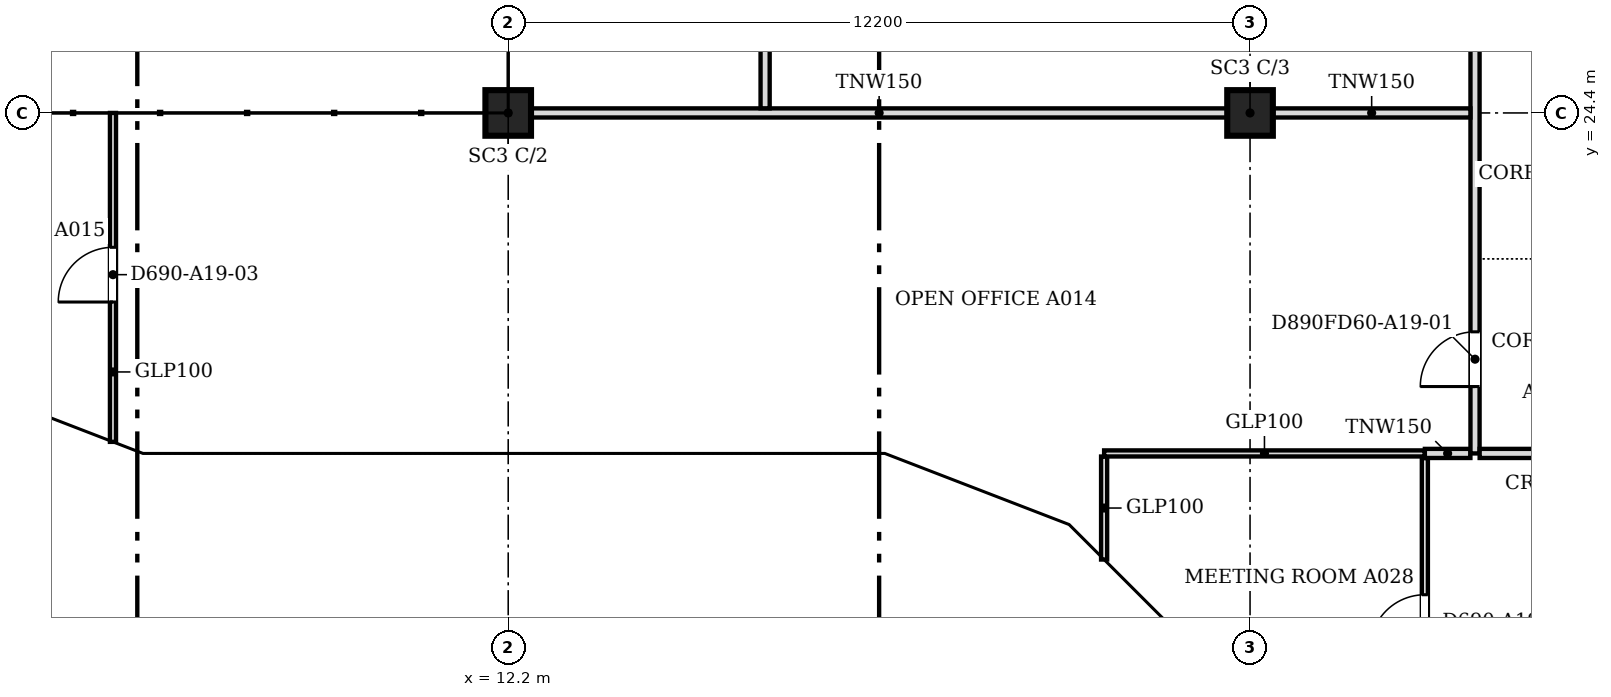
"""IFC4 building model, lengths in metres.
Left out: names, types, materials, properties, quantities, classifications, styles, units other than length and angle.
Written with IfcOpenShell. Run it as: python <this file> out.ifc"""

import sys

from ifc_helpers import new_model, si_unit, direction, frame, frame_2d, origin, origin_2d, place, context, subcontext, project, spatial, polyline, rectangle, outline, extrude, faceted_brep, source, transform, mapped, element, fill, save


model = new_model("IFC4")
c1 = context("Model", 3, precision=1e-05, world=origin(), true_north=direction((0.0, 1.0)))
c2 = subcontext(c1, "Body", "Model", "MODEL_VIEW")
j1 = project(units=[si_unit("LENGTHUNIT", "METRE"), si_unit("PLANEANGLEUNIT", "RADIAN")], contexts=[c1])
p1 = place(None, origin())
s1 = spatial("IfcSite", under=j1, at=p1, CompositionType="ELEMENT")
p2 = place(p1, origin())
s2 = spatial("IfcBuilding", under=s1, at=p2, CompositionType="ELEMENT")
p3 = place(p2, frame((0.0, 0.0, 209.3)))
s3 = spatial("IfcBuildingStorey", under=s2, at=p3, CompositionType="ELEMENT", Elevation=209.3)
for number, where, z_axis, x_axis in (
    (1, (12.2, 24.4, 0.0), (0.0, 0.0, 1.0), (1.0, 0.0, 0.0)),
    (2, (24.4, 24.4, 0.0), (0.0, 0.0, 1.0), (1.0, 0.0, 0.0)),
):
    element("IfcColumn", number, at=place(p3, frame(where, z_axis=z_axis, x_axis=x_axis)), inside=s3, PredefinedType="COLUMN", context=c2, shape_type="SweptSolid", body=[
        extrude(rectangle(XDim=0.75, YDim=0.75, at=origin_2d()), origin(), (0.0, 0.0, 1.0), 3.6),
    ])
m1 = source(origin(), c2, "Body", "Brep", [
    faceted_brep([(0.053, -0.25, 0.0), (3.003, -0.25, 3.8), (0.053, -0.25, 7.6), (0.0, -0.25, 7.532), (0.0, -0.25, 0.068), (0.106, 0.25, 7.532), (2.957, 0.25, 3.86), (2.957, 0.25, 3.74), (0.106, 0.25, 0.068), (3.003, 0.0, 3.8), (0.053, 0.0, 0.0), (0.053, 0.0, 7.6)], [[[0, 1, 2, 3, 4]], [[5, 6, 7, 8]], [[8, 7, 9, 1, 0, 10]], [[6, 5, 11, 2, 1, 9]], [[3, 2, 11]], [[10, 0, 4]], [[8, 10, 4, 3, 11, 5]], [[9, 7, 6]]]),
])
p4 = place(p3, frame((3.344, 19.631, -3.8), z_axis=(0.0, 0.0, 1.0), x_axis=(0.933007896601, -0.359855894603, 0.0)))
e3 = element("IfcWall", 3, at=p4, inside=s3, PredefinedType="SOLIDWALL", context=c2, shape_type="MappedRepresentation", body=[
    mapped(m1, transform((0.0, 0.0, 0.0), scale=1.0)),
])
m2 = source(origin(), c2, "Body", "SweptSolid", [
    extrude(outline(polyline([(0.253, 0.665), (2.687, 3.8), (0.253, 6.935), (0.253, 0.665)])), frame((0.0, 0.26, 0.0), z_axis=(0.0, -1.0, 0.0), x_axis=(1.0, 0.0, 0.0)), (0.0, 0.0, 1.0), 0.52),
])
p5 = place(p4, origin())
e4 = element("IfcOpeningElement", 4, at=p5, cuts=e3, PredefinedType="OPENING", context=c2, shape_type="MappedRepresentation", body=[
    mapped(m2, transform((0.0, 0.0, 0.0), scale=1.0)),
])
m3 = source(origin(), c2, "Body", "Brep", [
    faceted_brep([(3.003, -0.25, 0.0), (6.053, -0.25, 3.8), (3.003, -0.25, 7.6), (0.0, -0.25, 3.8), (0.047, 0.25, 3.859), (3.003, 0.25, 7.6), (6.053, 0.25, 3.8), (3.003, 0.25, 0.0), (0.047, 0.25, 3.741), (0.0, 0.0, 3.8)], [[[0, 1, 2, 3]], [[4, 5, 6, 7, 8]], [[7, 6, 1, 0]], [[6, 5, 2, 1]], [[5, 4, 9, 3, 2]], [[8, 7, 0, 3, 9]], [[8, 9, 4]]]),
])
p6 = place(p3, frame((6.146, 18.55, -3.8), z_axis=(0.0, 0.0, 1.0), x_axis=(1.0, 0.0, 0.0)))
e5 = element("IfcWall", 5, at=p6, inside=s3, PredefinedType="SOLIDWALL", context=c2, shape_type="MappedRepresentation", body=[
    mapped(m3, transform((0.0, 0.0, 0.0), scale=1.0)),
])
m4 = source(origin(), c2, "Body", "SweptSolid", [
    extrude(outline(polyline([(3.005, 0.401), (5.733, 3.8), (3.005, 7.199), (0.319, 3.8), (3.005, 0.401)])), frame((0.0, 0.26, 0.0), z_axis=(0.0, -1.0, 0.0), x_axis=(1.0, 0.0, 0.0)), (0.0, 0.0, 1.0), 0.52),
])
p7 = place(p6, origin())
e6 = element("IfcOpeningElement", 6, at=p7, cuts=e5, PredefinedType="OPENING", context=c2, shape_type="MappedRepresentation", body=[
    mapped(m4, transform((0.0, 0.0, 0.0), scale=1.0)),
])
m5 = source(origin(), c2, "Body", "Brep", [
    faceted_brep([(3.05, -0.25, 0.0), (6.1, -0.25, 3.743), (6.1, -0.25, 3.857), (3.05, -0.25, 7.6), (0.0, -0.25, 3.8), (0.0, 0.25, 3.8), (3.05, 0.25, 7.6), (6.146, 0.25, 3.8), (3.05, 0.25, 0.0), (6.146, -0.0, 3.8)], [[[0, 1, 2, 3, 4]], [[5, 6, 7, 8]], [[8, 7, 9, 1, 0]], [[7, 6, 3, 2, 9]], [[6, 5, 4, 3]], [[5, 8, 0, 4]], [[1, 9, 2]]]),
])
p8 = place(p3, frame((12.2, 18.55, -3.8), z_axis=(0.0, 0.0, 1.0), x_axis=(1.0, 0.0, 0.0)))
e7 = element("IfcWall", 7, at=p8, inside=s3, PredefinedType="SOLIDWALL", context=c2, shape_type="MappedRepresentation", body=[
    mapped(m5, transform((0.0, 0.0, 0.0), scale=1.0)),
])
m6 = source(origin(), c2, "Body", "SweptSolid", [
    extrude(outline(polyline([(3.052, 0.397), (5.824, 3.8), (3.052, 7.202), (0.321, 3.8), (3.052, 0.397)])), frame((0.0, 0.26, 0.0), z_axis=(0.0, -1.0, 0.0), x_axis=(1.0, 0.0, 0.0)), (0.0, 0.0, 1.0), 0.52),
])
p9 = place(p8, origin())
e8 = element("IfcOpeningElement", 8, at=p9, cuts=e7, PredefinedType="OPENING", context=c2, shape_type="MappedRepresentation", body=[
    mapped(m6, transform((0.0, 0.0, 0.0), scale=1.0)),
])
m7 = source(origin(), c2, "Body", "Brep", [
    faceted_brep([(3.096, -0.25, 7.536), (0.047, -0.25, 3.856), (0.047, -0.25, 3.744), (3.096, -0.25, 0.064), (0.0, 0.25, 3.8), (3.149, 0.25, 7.6), (3.202, 0.25, 7.536), (3.202, 0.25, 0.064), (3.149, 0.25, 0.0), (3.149, -0.0, 0.0), (3.149, -0.0, 7.6), (0.0, 0.0, 3.8)], [[[0, 1, 2, 3]], [[4, 5, 6, 7, 8]], [[8, 7, 9]], [[6, 5, 10]], [[5, 4, 11, 1, 0, 10]], [[4, 8, 9, 3, 2, 11]], [[11, 2, 1]], [[3, 9, 7, 6, 10, 0]]]),
])
p10 = place(p3, frame((18.346, 18.55, -3.8), z_axis=(0.0, 0.0, 1.0), x_axis=(0.932985567668, -0.359913782069, 0.0)))
e9 = element("IfcWall", 9, at=p10, inside=s3, PredefinedType="SOLIDWALL", context=c2, shape_type="MappedRepresentation", body=[
    mapped(m7, transform((0.0, 0.0, 0.0), scale=1.0)),
])
m8 = source(origin(), c2, "Body", "SweptSolid", [
    extrude(outline(polyline([(2.949, 6.967), (0.325, 3.8), (2.949, 0.633), (2.949, 6.967)])), frame((0.0, 0.26, 0.0), z_axis=(0.0, -1.0, 0.0), x_axis=(1.0, 0.0, 0.0)), (0.0, 0.0, 1.0), 0.52),
])
p11 = place(p10, origin())
e10 = element("IfcOpeningElement", 10, at=p11, cuts=e9, PredefinedType="OPENING", context=c2, shape_type="MappedRepresentation", body=[
    mapped(m8, transform((0.0, 0.0, 0.0), scale=1.0)),
])
m9 = source(origin(), c2, "Body", "Brep", [
    faceted_brep([(0.106, -0.25, 0.064), (3.156, -0.25, 3.736), (3.156, -0.25, 3.864), (0.106, -0.25, 7.536), (0.0, 0.25, 7.536), (0.053, 0.25, 7.6), (3.209, 0.25, 3.8), (0.053, 0.25, 0.0), (0.0, 0.25, 0.064), (3.209, -0.0, 3.8), (0.053, 0.0, 0.0), (0.053, 0.0, 7.6)], [[[0, 1, 2, 3]], [[4, 5, 6, 7, 8]], [[7, 6, 9, 1, 0, 10]], [[6, 5, 11, 3, 2, 9]], [[5, 4, 11]], [[8, 7, 10]], [[8, 10, 0, 3, 11, 4]], [[1, 9, 2]]]),
])
p12 = place(p3, frame((21.248, 17.454, -3.8), z_axis=(0.0, 0.0, 1.0), x_axis=(0.707106781187, -0.707106781187, 0.0)))
e11 = element("IfcWall", 11, at=p12, inside=s3, PredefinedType="SOLIDWALL", context=c2, shape_type="MappedRepresentation", body=[
    mapped(m9, transform((0.0, 0.0, 0.0), scale=1.0)),
])
m10 = source(origin(), c2, "Body", "SweptSolid", [
    extrude(outline(polyline([(0.253, 0.632), (2.884, 3.8), (0.253, 6.968), (0.253, 0.632)])), frame((0.0, 0.26, 0.0), z_axis=(0.0, -1.0, 0.0), x_axis=(1.0, 0.0, 0.0)), (0.0, 0.0, 1.0), 0.52),
])
p13 = place(p12, origin())
e12 = element("IfcOpeningElement", 12, at=p13, cuts=e11, PredefinedType="OPENING", context=c2, shape_type="MappedRepresentation", body=[
    mapped(m10, transform((0.0, 0.0, 0.0), scale=1.0)),
])
p14 = place(p2, frame((0.0, 0.0, 213.1)))
s4 = spatial("IfcBuildingStorey", under=s2, at=p14, CompositionType="ELEMENT", Elevation=213.1)
m11 = source(origin(), c2, "Body", "Brep", [
    faceted_brep([(2.95, -0.25, 0.0), (2.997, -0.25, 0.059), (2.997, -0.25, 7.541), (2.95, -0.25, 7.6), (0.0, -0.25, 3.8), (0.053, 0.25, 3.868), (2.904, 0.25, 7.54), (2.904, 0.25, 0.06), (0.053, 0.25, 3.732), (2.95, 0.0, 0.0), (2.95, 0.0, 7.6), (0.0, 0.0, 3.8)], [[[0, 1, 2, 3, 4]], [[5, 6, 7, 8]], [[1, 0, 9]], [[10, 3, 2]], [[6, 5, 11, 4, 3, 10]], [[8, 7, 9, 0, 4, 11]], [[8, 11, 5]], [[1, 9, 7, 6, 10, 2]]]),
])
p15 = place(p14, frame((3.394, 19.612, -3.8), z_axis=(0.0, 0.0, 1.0), x_axis=(0.932990326376, -0.359901446078, 0.0)))
e13 = element("IfcWall", 13, at=p15, inside=s4, PredefinedType="SOLIDWALL", context=c2, shape_type="MappedRepresentation", body=[
    mapped(m11, transform((0.0, 0.0, 0.0), scale=1.0)),
])
m12 = source(origin(), c2, "Body", "SweptSolid", [
    extrude(outline(polyline([(2.75, 6.935), (0.316, 3.8), (2.75, 0.665), (2.75, 6.935)])), frame((0.0, 0.26, 0.0), z_axis=(0.0, -1.0, 0.0), x_axis=(1.0, 0.0, 0.0)), (0.0, 0.0, 1.0), 0.52),
])
p16 = place(p15, origin())
e14 = element("IfcOpeningElement", 14, at=p16, cuts=e13, PredefinedType="OPENING", context=c2, shape_type="MappedRepresentation", body=[
    mapped(m12, transform((0.0, 0.0, 0.0), scale=1.0)),
])
m13 = source(origin(), c2, "Body", "Brep", [
    faceted_brep([(0.047, -0.25, 0.0), (3.05, -0.25, 3.8), (0.047, -0.25, 7.6), (0.0, -0.25, 7.54), (0.0, -0.25, 0.06), (0.093, 0.25, 7.541), (3.05, 0.25, 3.8), (0.093, 0.25, 0.059), (0.047, 0.0, 0.0), (0.047, 0.0, 7.6)], [[[0, 1, 2, 3, 4]], [[5, 6, 7]], [[7, 6, 1, 0, 8]], [[6, 5, 9, 2, 1]], [[3, 2, 9]], [[8, 0, 4]], [[7, 8, 4, 3, 9, 5]]]),
])
p17 = place(p14, frame((6.1, 18.55, -3.8), z_axis=(0.0, 0.0, 1.0), x_axis=(1.0, 0.0, 0.0)))
e15 = element("IfcWall", 15, at=p17, inside=s4, PredefinedType="SOLIDWALL", context=c2, shape_type="MappedRepresentation", body=[
    mapped(m13, transform((0.0, 0.0, 0.0), scale=1.0)),
])
m14 = source(origin(), c2, "Body", "SweptSolid", [
    extrude(outline(polyline([(0.247, 0.656), (2.731, 3.8), (0.247, 6.944), (0.247, 0.656)])), frame((0.0, 0.26, 0.0), z_axis=(0.0, -1.0, 0.0), x_axis=(1.0, 0.0, 0.0)), (0.0, 0.0, 1.0), 0.52),
])
p18 = place(p17, origin())
e16 = element("IfcOpeningElement", 16, at=p18, cuts=e15, PredefinedType="OPENING", context=c2, shape_type="MappedRepresentation", body=[
    mapped(m14, transform((0.0, 0.0, 0.0), scale=1.0)),
])
m15 = source(origin(), c2, "Body", "SweptSolid", [
    extrude(outline(polyline([(3.05, 0.0), (6.1, 3.8), (3.05, 7.6), (0.0, 3.8), (3.05, 0.0)])), frame((0.0, 0.25, 0.0), z_axis=(0.0, -1.0, 0.0), x_axis=(1.0, 0.0, 0.0)), (0.0, 0.0, 1.0), 0.5),
])
p19 = place(p14, frame((9.15, 18.55, -3.8), z_axis=(0.0, 0.0, 1.0), x_axis=(1.0, 0.0, 0.0)))
e17 = element("IfcWall", 17, at=p19, inside=s4, PredefinedType="SOLIDWALL", context=c2, shape_type="MappedRepresentation", body=[
    mapped(m15, transform((0.0, 0.0, 0.0), scale=1.0)),
])
m16 = source(origin(), c2, "Body", "SweptSolid", [
    extrude(outline(polyline([(3.05, 0.399), (5.78, 3.8), (3.05, 7.2), (0.321, 3.8), (3.05, 0.399)])), frame((0.0, 0.26, 0.0), z_axis=(0.0, -1.0, 0.0), x_axis=(1.0, 0.0, 0.0)), (0.0, 0.0, 1.0), 0.52),
])
p20 = place(p19, origin())
e18 = element("IfcOpeningElement", 18, at=p20, cuts=e17, PredefinedType="OPENING", context=c2, shape_type="MappedRepresentation", body=[
    mapped(m16, transform((0.0, 0.0, 0.0), scale=1.0)),
])
m17 = source(origin(), c2, "Body", "Brep", [
    faceted_brep([(3.05, -0.25, 7.543), (0.0, -0.25, 3.8), (3.05, -0.25, 0.057), (0.0, 0.25, 3.8), (3.096, 0.25, 7.6), (3.143, 0.25, 7.543), (3.143, 0.25, 0.056), (3.096, 0.25, 0.0), (3.096, -0.0, 0.0), (3.096, -0.0, 7.6)], [[[0, 1, 2]], [[3, 4, 5, 6, 7]], [[7, 6, 8]], [[5, 4, 9]], [[4, 3, 1, 0, 9]], [[3, 7, 8, 2, 1]], [[2, 8, 6, 5, 9, 0]]]),
])
p21 = place(p14, frame((15.25, 18.55, -3.8), z_axis=(0.0, 0.0, 1.0), x_axis=(1.0, 0.0, 0.0)))
e19 = element("IfcWall", 19, at=p21, inside=s4, PredefinedType="SOLIDWALL", context=c2, shape_type="MappedRepresentation", body=[
    mapped(m17, transform((0.0, 0.0, 0.0), scale=1.0)),
])
m18 = source(origin(), c2, "Body", "SweptSolid", [
    extrude(outline(polyline([(2.896, 6.959), (0.323, 3.8), (2.896, 0.641), (2.896, 6.959)])), frame((0.0, 0.26, 0.0), z_axis=(0.0, -1.0, 0.0), x_axis=(1.0, 0.0, 0.0)), (0.0, 0.0, 1.0), 0.52),
])
p22 = place(p21, origin())
e20 = element("IfcOpeningElement", 20, at=p22, cuts=e19, PredefinedType="OPENING", context=c2, shape_type="MappedRepresentation", body=[
    mapped(m18, transform((0.0, 0.0, 0.0), scale=1.0)),
])
m19 = source(origin(), c2, "Body", "Brep", [
    faceted_brep([(0.093, -0.25, 0.056), (3.143, -0.25, 3.736), (3.143, -0.25, 3.864), (0.093, -0.25, 7.544), (0.0, 0.25, 7.543), (0.047, 0.25, 7.6), (3.196, 0.25, 3.8), (0.047, 0.25, 0.0), (0.0, 0.25, 0.057), (3.196, -0.0, 3.8), (0.047, 0.0, 0.0), (0.047, 0.0, 7.6)], [[[0, 1, 2, 3]], [[4, 5, 6, 7, 8]], [[7, 6, 9, 1, 0, 10]], [[6, 5, 11, 3, 2, 9]], [[5, 4, 11]], [[8, 7, 10]], [[8, 10, 0, 3, 11, 4]], [[1, 9, 2]]]),
])
p23 = place(p14, frame((18.303, 18.567, -3.8), z_axis=(0.0, 0.0, 1.0), x_axis=(0.932978940178, -0.359930961693, 0.0)))
e21 = element("IfcWall", 21, at=p23, inside=s4, PredefinedType="SOLIDWALL", context=c2, shape_type="MappedRepresentation", body=[
    mapped(m19, transform((0.0, 0.0, 0.0), scale=1.0)),
])
m20 = source(origin(), c2, "Body", "SweptSolid", [
    extrude(outline(polyline([(0.247, 0.633), (2.871, 3.8), (0.247, 6.967), (0.247, 0.633)])), frame((0.0, 0.26, 0.0), z_axis=(0.0, -1.0, 0.0), x_axis=(1.0, 0.0, 0.0)), (0.0, 0.0, 1.0), 0.52),
])
p24 = place(p23, origin())
e22 = element("IfcOpeningElement", 22, at=p24, cuts=e21, PredefinedType="OPENING", context=c2, shape_type="MappedRepresentation", body=[
    mapped(m20, transform((0.0, 0.0, 0.0), scale=1.0)),
])
m21 = source(origin(), c2, "Body", "Brep", [
    faceted_brep([(3.103, -0.25, 7.536), (0.053, -0.25, 3.864), (0.053, -0.25, 3.736), (3.103, -0.25, 0.064), (0.0, 0.25, 3.8), (3.156, 0.25, 7.6), (3.209, 0.25, 7.536), (3.209, 0.25, 0.064), (3.156, 0.25, 0.0), (3.156, -0.0, 0.0), (3.156, -0.0, 7.6), (0.0, 0.0, 3.8)], [[[0, 1, 2, 3]], [[4, 5, 6, 7, 8]], [[8, 7, 9]], [[6, 5, 10]], [[5, 4, 11, 1, 0, 10]], [[4, 8, 9, 3, 2, 11]], [[2, 1, 11]], [[3, 9, 7, 6, 10, 0]]]),
])
p25 = place(p14, frame((21.285, 17.417, -3.8), z_axis=(0.0, 0.0, 1.0), x_axis=(0.707106781187, -0.707106781187, 0.0)))
e23 = element("IfcWall", 23, at=p25, inside=s4, PredefinedType="SOLIDWALL", context=c2, shape_type="MappedRepresentation", body=[
    mapped(m21, transform((0.0, 0.0, 0.0), scale=1.0)),
])
m22 = source(origin(), c2, "Body", "SweptSolid", [
    extrude(outline(polyline([(2.956, 6.968), (0.325, 3.8), (2.956, 0.632), (2.956, 6.968)])), frame((0.0, 0.26, 0.0), z_axis=(0.0, -1.0, 0.0), x_axis=(1.0, 0.0, 0.0)), (0.0, 0.0, 1.0), 0.52),
])
p26 = place(p25, origin())
e24 = element("IfcOpeningElement", 24, at=p26, cuts=e23, PredefinedType="OPENING", context=c2, shape_type="MappedRepresentation", body=[
    mapped(m22, transform((0.0, 0.0, 0.0), scale=1.0)),
])
p27 = place(p3, frame((27.275, 13.276, 0.0), z_axis=(0.0, 0.0, 1.0), x_axis=(0.0, 1.0, 0.0)))
e25 = element("IfcWall", 25, at=p27, inside=s3, PredefinedType="PARTITIONING", context=c2, shape_type="SweptSolid", body=[
    extrude(rectangle(XDim=5.448, YDim=0.1, at=frame_2d((2.724, 0.0))), origin(), (0.0, 0.0, 1.0), 3.067),
])
m23 = source(origin(), c2, "Body", "SweptSolid", [
    extrude(rectangle(XDim=0.9, YDim=2.1, at=frame_2d((0.45, 1.05))), frame((0.0, 0.06, 0.0), z_axis=(0.0, -1.0, 0.0), x_axis=(1.0, 0.0, 0.0)), (0.0, 0.0, 1.0), 0.12),
])
p28 = place(p27, frame((2.3, 0.0, 0.0)))
e26 = element("IfcOpeningElement", 26, at=p28, cuts=e25, PredefinedType="OPENING", context=c2, shape_type="MappedRepresentation", body=[
    mapped(m23, transform((0.0, 0.0, 0.0), scale=1.0)),
])
p29 = place(p3, frame((22.0, 17.055, 0.0), z_axis=(0.0, 0.0, 1.0), x_axis=(0.0, 1.0, 0.0)))
e27 = element("IfcWall", 27, at=p29, inside=s3, PredefinedType="PARTITIONING", context=c2, shape_type="SweptSolid", body=[
    extrude(rectangle(XDim=1.694, YDim=0.1, at=frame_2d((0.847, 0.0))), origin(), (0.0, 0.0, 1.0), 3.067),
])
p30 = place(p3, frame((22.0, 18.8, 0.0), z_axis=(0.0, 0.0, 1.0), x_axis=(1.0, 0.0, 0.0)))
e28 = element("IfcWall", 28, at=p30, inside=s3, PredefinedType="PARTITIONING", context=c2, shape_type="SweptSolid", body=[
    extrude(rectangle(XDim=5.274, YDim=0.1, at=frame_2d((2.637, 0.0))), origin(), (0.0, 0.0, 1.0), 3.067),
])
p31 = place(p3, frame((27.275, 18.8, 0.0), z_axis=(0.0, 0.0, 1.0), x_axis=(1.0, 0.0, 0.0)))
e29 = element("IfcWall", 29, at=p31, inside=s3, PredefinedType="PARTITIONING", context=c2, shape_type="SweptSolid", body=[
    extrude(rectangle(XDim=0.749, YDim=0.15, at=frame_2d((0.375, 0.0))), origin(), (0.0, 0.0, 1.0), 3.067),
])
p32 = place(p3, frame((28.1, 18.8, 0.0), z_axis=(0.0, 0.0, 1.0), x_axis=(0.0, 1.0, 0.0)))
e30 = element("IfcWall", 30, at=p32, inside=s3, PredefinedType="PARTITIONING", context=c2, shape_type="SweptSolid", body=[
    extrude(rectangle(XDim=26.024, YDim=0.15, at=frame_2d((13.012, 0.0))), origin(), (0.0, 0.0, 1.0), 3.067),
])
m24 = source(origin(), c2, "Body", "SweptSolid", [
    extrude(rectangle(XDim=0.9, YDim=2.1, at=frame_2d((0.45, 1.05))), frame((0.0, 0.085, 0.0), z_axis=(0.0, -1.0, 0.0), x_axis=(1.0, 0.0, 0.0)), (0.0, 0.0, 1.0), 0.17),
])
p33 = place(p32, frame((1.1, 0.0, 0.0)))
e31 = element("IfcOpeningElement", 31, at=p33, cuts=e30, PredefinedType="OPENING", context=c2, shape_type="MappedRepresentation", body=[
    mapped(m24, transform((0.0, 0.0, 0.0), scale=1.0)),
])
m25 = source(origin(), c2, "Body", "SweptSolid", [
    extrude(rectangle(XDim=1.0, YDim=2.1, at=frame_2d((0.5, 1.05))), frame((0.0, 0.085, 0.0), z_axis=(0.0, -1.0, 0.0), x_axis=(1.0, 0.0, 0.0)), (0.0, 0.0, 1.0), 0.17),
])
p34 = place(p32, frame((14.201, 0.0, 0.0)))
e32 = element("IfcOpeningElement", 32, at=p34, cuts=e30, PredefinedType="OPENING", context=c2, shape_type="MappedRepresentation", body=[
    mapped(m25, transform((0.0, 0.0, 0.0), scale=1.0)),
])
p35 = place(p32, frame((8.1, 0.0, 0.0)))
e33 = element("IfcOpeningElement", 33, at=p35, cuts=e30, PredefinedType="OPENING", context=c2, shape_type="MappedRepresentation", body=[
    mapped(m25, transform((0.0, 0.0, 0.0), scale=1.0)),
])
p36 = place(p32, frame((21.5, 0.0, 0.0)))
e34 = element("IfcOpeningElement", 34, at=p36, cuts=e30, PredefinedType="OPENING", context=c2, shape_type="MappedRepresentation", body=[
    mapped(m24, transform((0.0, 0.0, 0.0), scale=1.0)),
])
p37 = place(p3, frame((28.176, 18.8, 0.0), z_axis=(0.0, 0.0, 1.0), x_axis=(1.0, 0.0, 0.0)))
e35 = element("IfcWall", 35, at=p37, inside=s3, PredefinedType="PARTITIONING", context=c2, shape_type="SweptSolid", body=[
    extrude(rectangle(XDim=2.248, YDim=0.15, at=frame_2d((1.124, 0.0))), origin(), (0.0, 0.0, 1.0), 3.067),
])
p38 = place(p3, frame((5.7, 18.99, 0.0), z_axis=(0.0, 0.0, 1.0), x_axis=(0.0, 1.0, 0.0)))
e36 = element("IfcWall", 36, at=p38, inside=s3, PredefinedType="PARTITIONING", context=c2, shape_type="SweptSolid", body=[
    extrude(rectangle(XDim=5.41, YDim=0.1, at=frame_2d((2.705, 0.0))), origin(), (0.0, 0.0, 1.0), 3.067),
])
p39 = place(p38, frame((2.3, 0.0, 0.0)))
e37 = element("IfcOpeningElement", 37, at=p39, cuts=e36, PredefinedType="OPENING", context=c2, shape_type="MappedRepresentation", body=[
    mapped(m23, transform((0.0, 0.0, 0.0), scale=1.0)),
])
p40 = place(p3, frame((12.576, 24.4, 0.0), z_axis=(0.0, 0.0, 1.0), x_axis=(1.0, 0.0, 0.0)))
e38 = element("IfcWall", 38, at=p40, inside=s3, PredefinedType="PARTITIONING", context=c2, shape_type="SweptSolid", body=[
    extrude(rectangle(XDim=11.448, YDim=0.15, at=frame_2d((5.724, 0.0))), origin(), (0.0, 0.0, 1.0), 3.067),
])
p41 = place(p3, frame((24.776, 24.4, 0.0), z_axis=(0.0, 0.0, 1.0), x_axis=(1.0, 0.0, 0.0)))
e39 = element("IfcWall", 39, at=p41, inside=s3, PredefinedType="PARTITIONING", context=c2, shape_type="SweptSolid", body=[
    extrude(rectangle(XDim=3.248, YDim=0.15, at=frame_2d((1.624, 0.0))), origin(), (0.0, 0.0, 1.0), 3.067),
])
p42 = place(p3, frame((16.425, 24.476, 0.0), z_axis=(0.0, 0.0, 1.0), x_axis=(0.0, 1.0, 0.0)))
e40 = element("IfcWall", 40, at=p42, inside=s3, PredefinedType="PARTITIONING", context=c2, shape_type="SweptSolid", body=[
    extrude(rectangle(XDim=5.948, YDim=0.15, at=frame_2d((2.974, 0.0))), origin(), (0.0, 0.0, 1.0), 3.067),
])
p43 = place(p42, frame((2.5, 0.0, 0.0)))
e41 = element("IfcOpeningElement", 41, at=p43, cuts=e40, PredefinedType="OPENING", context=c2, shape_type="MappedRepresentation", body=[
    mapped(m24, transform((0.0, 0.0, 0.0), scale=1.0)),
])
m26 = source(origin(), c2, "Body", "SweptSolid", [
    extrude(rectangle(XDim=0.9, YDim=2.1, at=frame_2d((0.45, 1.05))), frame((0.0, 0.025, 0.0), z_axis=(0.0, -1.0, 0.0), x_axis=(1.0, 0.0, 0.0)), (0.0, 0.0, 1.0), 0.05),
])
p44 = place(p33, origin())
e42 = element("IfcDoor", 42, at=p44, inside=s3, OperationType="SINGLE_SWING_LEFT", PredefinedType="DOOR", context=c2, shape_type="MappedRepresentation", body=[
    mapped(m26, transform((0.0, 0.0, 0.0), scale=1.0)),
])
fill(e31, e42)
p45 = place(p39, origin())
e43 = element("IfcDoor", 43, at=p45, inside=s3, OperationType="SINGLE_SWING_LEFT", PredefinedType="DOOR", context=c2, shape_type="MappedRepresentation", body=[
    mapped(m26, transform((0.0, 0.0, 0.0), scale=1.0)),
])
fill(e37, e43)
p46 = place(p28, origin())
e44 = element("IfcDoor", 44, at=p46, inside=s3, OperationType="SINGLE_SWING_LEFT", PredefinedType="DOOR", context=c2, shape_type="MappedRepresentation", body=[
    mapped(m26, transform((0.0, 0.0, 0.0), scale=1.0)),
])
fill(e26, e44)
save(model, sys.argv[1])
